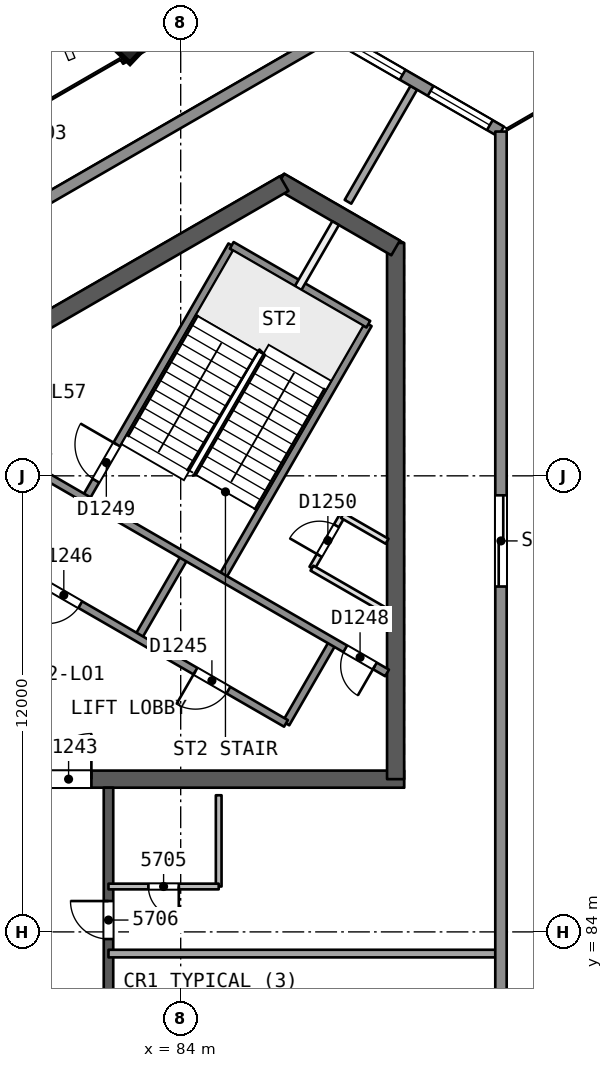
"""IFC4 building model, lengths in metres.
Left out: names, types, materials, properties, quantities, classifications, styles, units other than length and angle.
Written with IfcOpenShell. Run it as: python <this file> out.ifc"""

import sys

from ifc_helpers import new_model, si_unit, direction, frame, frame_2d, origin, origin_2d, place, context, subcontext, project, spatial, rectangle, extrude, element, fill, save


model = new_model("IFC4")
c1 = context("Model", 3, precision=1e-05, world=origin(), true_north=direction((0.0, 1.0)))
c2 = subcontext(c1, "Body", "Model", "MODEL_VIEW")
j1 = project(units=[si_unit("LENGTHUNIT", "METRE"), si_unit("PLANEANGLEUNIT", "RADIAN")], contexts=[c1])
p1 = place(None, origin())
s1 = spatial("IfcSite", under=j1, at=p1, CompositionType="ELEMENT")
p2 = place(p1, origin())
s2 = spatial("IfcBuilding", under=s1, at=p2, CompositionType="ELEMENT")
p3 = place(p2, frame((0.0, 0.0, 231.7)))
s3 = spatial("IfcBuildingStorey", under=s2, at=p3, CompositionType="ELEMENT", Elevation=231.7)
p4 = place(p3, frame((79.63, 88.019, 0.0), z_axis=(0.0, 0.0, 1.0), x_axis=(1.0, 0.0, 0.0)))
e1 = element("IfcWall", 1, at=p4, inside=s3, PredefinedType="SHEAR", context=c2, shape_type="SweptSolid", body=[
    extrude(rectangle(XDim=10.25, YDim=0.45, at=frame_2d((5.125, 0.0))), origin(), (0.0, 0.0, 1.0), 3.7),
])
p5 = place(p4, frame((0.82, 0.0, 0.0)))
e2 = element("IfcOpeningElement", 2, at=p5, cuts=e1, PredefinedType="OPENING", context=c2, shape_type="SweptSolid", body=[
    extrude(rectangle(XDim=1.2, YDim=2.1, at=frame_2d((0.6, 1.05))), frame((0.0, 0.235, 0.0), z_axis=(0.0, -1.0, 0.0), x_axis=(1.0, 0.0, 0.0)), (0.0, 0.0, 1.0), 0.471),
])
p6 = place(p3, frame((89.655, 88.019, 0.0), z_axis=(0.0, 0.0, 1.0), x_axis=(0.0, 1.0, 0.0)))
e3 = element("IfcWall", 3, at=p6, inside=s3, PredefinedType="SHEAR", context=c2, shape_type="SweptSolid", body=[
    extrude(rectangle(XDim=14.108, YDim=0.45, at=frame_2d((7.054, 0.0))), origin(), (0.0, 0.0, 1.0), 3.7),
])
p7 = place(p3, frame((89.655, 101.998, 0.0), z_axis=(0.0, 0.0, 1.0), x_axis=(-0.866042179588, 0.49997094233, 0.0)))
e4 = element("IfcWall", 4, at=p7, inside=s3, PredefinedType="SHEAR", context=c2, shape_type="SweptSolid", body=[
    extrude(rectangle(XDim=3.515, YDim=0.45, at=frame_2d((1.758, 0.0))), origin(), (0.0, 0.0, 1.0), 3.7),
])
p8 = place(p3, frame((86.723, 103.69, 0.0), z_axis=(0.0, 0.0, 1.0), x_axis=(-0.866022713978, -0.500004658852, 0.0)))
e5 = element("IfcWall", 5, at=p8, inside=s3, PredefinedType="SHEAR", context=c2, shape_type="SweptSolid", body=[
    extrude(rectangle(XDim=14.203, YDim=0.45, at=frame_2d((7.102, 0.0))), origin(), (0.0, 0.0, 1.0), 3.7),
])
p9 = place(p3, frame((82.1, 72.206, 0.0), z_axis=(0.0, 0.0, 1.0), x_axis=(0.0, 1.0, 0.0)))
e6 = element("IfcWall", 6, at=p9, inside=s3, PredefinedType="SHEAR", context=c2, shape_type="SweptSolid", body=[
    extrude(rectangle(XDim=15.588, YDim=0.25, at=frame_2d((7.794, 0.0))), origin(), (0.0, 0.0, 1.0), 3.3),
])
p10 = place(p9, frame((2.15, 0.0, 0.0)))
e7 = element("IfcOpeningElement", 7, at=p10, cuts=e6, PredefinedType="OPENING", context=c2, shape_type="SweptSolid", body=[
    extrude(rectangle(XDim=1.0, YDim=2.1, at=frame_2d((0.5, 1.05))), frame((0.0, 0.135, 0.0), z_axis=(0.0, -1.0, 0.0), x_axis=(1.0, 0.0, 0.0)), (0.0, 0.0, 1.0), 0.271),
])
p11 = place(p9, frame((7.662, 0.0, 0.0)))
e8 = element("IfcOpeningElement", 8, at=p11, cuts=e6, PredefinedType="OPENING", context=c2, shape_type="SweptSolid", body=[
    extrude(rectangle(XDim=1.2, YDim=2.4, at=frame_2d((0.6, 1.2))), frame((0.0, 0.135, 0.0), z_axis=(0.0, -1.0, 0.0), x_axis=(1.0, 0.0, 0.0)), (0.0, 0.0, 1.0), 0.271),
])
p12 = place(p9, frame((11.606, 0.0, 0.0)))
e9 = element("IfcOpeningElement", 9, at=p12, cuts=e6, PredefinedType="OPENING", context=c2, shape_type="SweptSolid", body=[
    extrude(rectangle(XDim=1.0, YDim=2.1, at=frame_2d((0.5, 1.05))), frame((0.0, 0.135, 0.0), z_axis=(0.0, -1.0, 0.0), x_axis=(1.0, 0.0, 0.0)), (0.0, 0.0, 1.0), 0.271),
])
p13 = place(p3, frame((91.483, 108.549, 0.0), z_axis=(-0.017607037296, -0.030466109479, 0.999380712447), x_axis=(0.500067085975, 0.865271470658, 0.035187946645)))
e10 = element("IfcColumn", 10, at=p13, inside=s3, PredefinedType="COLUMN", context=c2, shape_type="SweptSolid", body=[
    extrude(rectangle(XDim=1.9, YDim=1.9, at=origin_2d()), origin(), (0.0, 0.0, 1.0), 3.702),
])
p14 = place(p3, frame((82.659, 107.49, 0.0), z_axis=(-0.00837646992, -0.028097450282, 0.999570091609), x_axis=(0.866174253108, 0.499288249334, 0.021293363534)))
e11 = element("IfcColumn", 11, at=p14, inside=s3, PredefinedType="COLUMN", context=c2, shape_type="SweptSolid", body=[
    extrude(rectangle(XDim=0.85, YDim=0.85, at=origin_2d()), origin(), (0.0, 0.0, 1.0), 3.702),
])
p15 = place(p3, frame((92.279, 83.429, 0.0), z_axis=(0.0, 0.0, 1.0), x_axis=(-1.0, 0.0, 0.0)))
e12 = element("IfcWall", 12, at=p15, inside=s3, PredefinedType="PARTITIONING", context=c2, shape_type="SweptSolid", body=[
    extrude(rectangle(XDim=10.179, YDim=0.2, at=frame_2d((5.089, 0.0))), origin(), (0.0, 0.0, 1.0), 3.3),
])
p16 = place(p3, frame((85.0, 87.595, 0.0), z_axis=(0.0, 0.0, 1.0), x_axis=(0.0, -1.0, 0.0)))
e13 = element("IfcWall", 13, at=p16, inside=s3, PredefinedType="PARTITIONING", context=c2, shape_type="SweptSolid", body=[
    extrude(rectangle(XDim=2.401, YDim=0.15, at=frame_2d((1.2, 0.0))), origin(), (0.0, 0.0, 1.0), 3.3),
])
p17 = place(p3, frame((85.0, 85.194, 0.0), z_axis=(0.0, 0.0, 1.0), x_axis=(-1.0, 0.0, 0.0)))
e14 = element("IfcWall", 14, at=p17, inside=s3, PredefinedType="PARTITIONING", context=c2, shape_type="SweptSolid", body=[
    extrude(rectangle(XDim=2.9, YDim=0.15, at=frame_2d((1.45, 0.0))), origin(), (0.0, 0.0, 1.0), 3.3),
])
p18 = place(p17, frame((1.05, 0.0, 0.0)))
e15 = element("IfcOpeningElement", 15, at=p18, cuts=e14, PredefinedType="OPENING", context=c2, shape_type="SweptSolid", body=[
    extrude(rectangle(XDim=0.8, YDim=2.1, at=frame_2d((0.4, 1.05))), frame((0.0, 0.085, 0.0), z_axis=(0.0, -1.0, 0.0), x_axis=(1.0, 0.0, 0.0)), (0.0, 0.0, 1.0), 0.171),
])
p19 = place(p3, frame((90.134, 106.211, 0.0), z_axis=(0.0, 0.0, 1.0), x_axis=(-0.500019299785, -0.866014260761, 0.0)))
e16 = element("IfcWall", 16, at=p19, inside=s3, PredefinedType="PARTITIONING", context=c2, shape_type="SweptSolid", body=[
    extrude(rectangle(XDim=3.465, YDim=0.2, at=frame_2d((1.732, 0.0))), origin(), (0.0, 0.0, 1.0), 3.3),
])
p20 = place(p3, frame((87.988, 107.623, 0.0), z_axis=(0.0, 0.0, 1.0), x_axis=(0.866010338203, -0.500026093444, 0.0)))
e17 = element("IfcWall", 17, at=p20, inside=s3, PredefinedType="SOLIDWALL", context=c2, shape_type="SweptSolid", body=[
    extrude(rectangle(XDim=5.127, YDim=0.3, at=frame_2d((2.563, 0.0))), origin(), (0.0, 0.0, 1.0), 3.3),
])
p21 = place(p20, frame((2.988, 0.0, 0.9)))
e18 = element("IfcOpeningElement", 18, at=p21, cuts=e17, PredefinedType="OPENING", context=c2, shape_type="SweptSolid", body=[
    extrude(rectangle(XDim=1.8, YDim=1.5, at=frame_2d((0.9, 0.75))), frame((0.0, 0.161, 0.0), z_axis=(0.0, -1.0, 0.0), x_axis=(1.0, 0.0, 0.0)), (0.0, 0.0, 1.0), 0.321),
])
p22 = place(p20, frame((0.339, 0.0, 0.9)))
e19 = element("IfcOpeningElement", 19, at=p22, cuts=e17, PredefinedType="OPENING", context=c2, shape_type="SweptSolid", body=[
    extrude(rectangle(XDim=1.8, YDim=1.5, at=frame_2d((0.9, 0.75))), frame((0.0, 0.161, 0.0), z_axis=(0.0, -1.0, 0.0), x_axis=(1.0, 0.0, 0.0)), (0.0, 0.0, 1.0), 0.321),
])
p23 = place(p3, frame((92.428, 105.059, 0.0), z_axis=(0.0, 0.0, 1.0), x_axis=(0.0, -1.0, 0.0)))
e20 = element("IfcWall", 20, at=p23, inside=s3, PredefinedType="SOLIDWALL", context=c2, shape_type="SweptSolid", body=[
    extrude(rectangle(XDim=50.118, YDim=0.3, at=frame_2d((25.059, 0.0))), origin(), (0.0, 0.0, 1.0), 3.3),
])
p24 = place(p23, frame((29.003, 0.0, 0.0)))
e21 = element("IfcOpeningElement", 21, at=p24, cuts=e20, PredefinedType="OPENING", context=c2, shape_type="SweptSolid", body=[
    extrude(rectangle(XDim=2.4, YDim=2.4, at=frame_2d((1.2, 1.2))), frame((0.0, 0.161, 0.0), z_axis=(0.0, -1.0, 0.0), x_axis=(1.0, 0.0, 0.0)), (0.0, 0.0, 1.0), 0.321),
])
p25 = place(p23, frame((39.0, 0.0, 0.0)))
e22 = element("IfcOpeningElement", 22, at=p25, cuts=e20, PredefinedType="OPENING", context=c2, shape_type="SweptSolid", body=[
    extrude(rectangle(XDim=2.4, YDim=2.4, at=frame_2d((1.2, 1.2))), frame((0.0, 0.161, 0.0), z_axis=(0.0, -1.0, 0.0), x_axis=(1.0, 0.0, 0.0)), (0.0, 0.0, 1.0), 0.321),
])
p26 = place(p23, frame((9.572, 0.0, 0.0)))
e23 = element("IfcOpeningElement", 23, at=p26, cuts=e20, PredefinedType="OPENING", context=c2, shape_type="SweptSolid", body=[
    extrude(rectangle(XDim=2.4, YDim=2.4, at=frame_2d((1.2, 1.2))), frame((0.0, 0.161, 0.0), z_axis=(0.0, -1.0, 0.0), x_axis=(1.0, 0.0, 0.0)), (0.0, 0.0, 1.0), 0.321),
])
p27 = place(p23, frame((23.391, 0.0, 0.0)))
e24 = element("IfcOpeningElement", 24, at=p27, cuts=e20, PredefinedType="OPENING", context=c2, shape_type="SweptSolid", body=[
    extrude(rectangle(XDim=2.4, YDim=2.4, at=frame_2d((1.2, 1.2))), frame((0.0, 0.161, 0.0), z_axis=(0.0, -1.0, 0.0), x_axis=(1.0, 0.0, 0.0)), (0.0, 0.0, 1.0), 0.321),
])
p28 = place(p3, frame((44.584, 82.563, 0.0), z_axis=(0.0, 0.0, 1.0), x_axis=(0.866023992326, 0.500002444709, 0.0)))
e25 = element("IfcWall", 25, at=p28, inside=s3, PredefinedType="SOLIDWALL", context=c2, shape_type="SweptSolid", body=[
    extrude(rectangle(XDim=50.118, YDim=0.3, at=frame_2d((25.059, 0.0))), origin(), (0.0, 0.0, 1.0), 3.3),
])
p29 = place(p28, frame((23.391, 0.0, 0.0)))
e26 = element("IfcOpeningElement", 26, at=p29, cuts=e25, PredefinedType="OPENING", context=c2, shape_type="SweptSolid", body=[
    extrude(rectangle(XDim=2.4, YDim=2.4, at=frame_2d((1.2, 1.2))), frame((0.0, 0.161, 0.0), z_axis=(0.0, -1.0, 0.0), x_axis=(1.0, 0.0, 0.0)), (0.0, 0.0, 1.0), 0.321),
])
p30 = place(p28, frame((37.835, 0.0, 0.0)))
e27 = element("IfcOpeningElement", 27, at=p30, cuts=e25, PredefinedType="OPENING", context=c2, shape_type="SweptSolid", body=[
    extrude(rectangle(XDim=2.4, YDim=2.4, at=frame_2d((1.2, 1.2))), frame((0.0, 0.161, 0.0), z_axis=(0.0, -1.0, 0.0), x_axis=(1.0, 0.0, 0.0)), (0.0, 0.0, 1.0), 0.321),
])
p31 = place(p28, frame((9.416, 0.0, 0.0)))
e28 = element("IfcOpeningElement", 28, at=p31, cuts=e25, PredefinedType="OPENING", context=c2, shape_type="SweptSolid", body=[
    extrude(rectangle(XDim=2.4, YDim=2.4, at=frame_2d((1.2, 1.2))), frame((0.0, 0.161, 0.0), z_axis=(0.0, -1.0, 0.0), x_axis=(1.0, 0.0, 0.0)), (0.0, 0.0, 1.0), 0.321),
])
p32 = place(p3, frame((86.77, 89.486, 0.0), z_axis=(0.0, 0.0, 1.0), x_axis=(0.499961042966, 0.86604789447, 0.0)))
e29 = element("IfcWall", 29, at=p32, inside=s3, PredefinedType="SOLIDWALL", context=c2, shape_type="SweptSolid", body=[
    extrude(rectangle(XDim=2.48, YDim=0.2, at=frame_2d((1.24, 0.0))), origin(), (0.0, 0.0, 1.0), 3.3),
])
p33 = place(p3, frame((87.454, 93.571, 0.0), z_axis=(0.0, 0.0, 1.0), x_axis=(0.499995408039, 0.866028054938, 0.0)))
e30 = element("IfcWall", 30, at=p33, inside=s3, PredefinedType="PARTITIONING", context=c2, shape_type="SweptSolid", body=[
    extrude(rectangle(XDim=1.6, YDim=0.15, at=frame_2d((0.8, 0.0))), origin(), (0.0, 0.0, 1.0), 3.3),
])
p34 = place(p33, frame((0.387, 0.0, 0.0)))
e31 = element("IfcOpeningElement", 31, at=p34, cuts=e30, PredefinedType="OPENING", context=c2, shape_type="SweptSolid", body=[
    extrude(rectangle(XDim=0.9, YDim=2.1, at=frame_2d((0.45, 1.05))), frame((0.0, 0.085, 0.0), z_axis=(0.0, -1.0, 0.0), x_axis=(1.0, 0.0, 0.0)), (0.0, 0.0, 1.0), 0.171),
])
p35 = place(p3, frame((85.087, 93.321, 0.0), z_axis=(0.0, 0.0, 1.0), x_axis=(0.500019787375, 0.866013979237, 0.0)))
e32 = element("IfcWall", 32, at=p35, inside=s3, PredefinedType="SOLIDWALL", context=c2, shape_type="SweptSolid", body=[
    extrude(rectangle(XDim=7.7, YDim=0.2, at=frame_2d((3.85, 0.0))), origin(), (0.0, 0.0, 1.0), 3.3),
])
p36 = place(p3, frame((82.873, 91.736, 0.0), z_axis=(0.0, 0.0, 1.0), x_axis=(0.499961042966, 0.86604789447, 0.0)))
e33 = element("IfcWall", 33, at=p36, inside=s3, PredefinedType="SOLIDWALL", context=c2, shape_type="SweptSolid", body=[
    extrude(rectangle(XDim=2.48, YDim=0.2, at=frame_2d((1.24, 0.0))), origin(), (0.0, 0.0, 1.0), 3.3),
])
p37 = place(p3, frame((87.09, 100.94, 0.0), z_axis=(0.0, 0.0, 1.0), x_axis=(0.500011643316, 0.866018681408, 0.0)))
e34 = element("IfcWall", 34, at=p37, inside=s3, PredefinedType="PARTITIONING", context=c2, shape_type="SweptSolid", body=[
    extrude(rectangle(XDim=1.973, YDim=0.2, at=frame_2d((0.987, 0.0))), origin(), (0.0, 0.0, 1.0), 3.3),
])
p38 = place(p3, frame((81.493, 95.396, 0.0), z_axis=(0.0, 0.0, 1.0), x_axis=(0.500006057782, 0.866021906294, 0.0)))
e35 = element("IfcWall", 35, at=p38, inside=s3, PredefinedType="SOLIDWALL", context=c2, shape_type="SweptSolid", body=[
    extrude(rectangle(XDim=7.7, YDim=0.2, at=frame_2d((3.85, 0.0))), origin(), (0.0, 0.0, 1.0), 3.3),
])
p39 = place(p38, frame((0.55, 0.0, 0.0)))
e36 = element("IfcOpeningElement", 36, at=p39, cuts=e35, PredefinedType="OPENING", context=c2, shape_type="SweptSolid", body=[
    extrude(rectangle(XDim=1.1, YDim=2.1, at=frame_2d((0.55, 1.05))), frame((0.0, 0.11, 0.0), z_axis=(0.0, -1.0, 0.0), x_axis=(1.0, 0.0, 0.0)), (0.0, 0.0, 1.0), 0.221),
])
p40 = place(p3, frame((86.77, 89.486, 0.0), z_axis=(0.0, 0.0, 1.0), x_axis=(-0.86601811187, 0.500012629753, 0.0)))
e37 = element("IfcWall", 37, at=p40, inside=s3, PredefinedType="SOLIDWALL", context=c2, shape_type="SweptSolid", body=[
    extrude(rectangle(XDim=10.9, YDim=0.2, at=frame_2d((5.45, 0.0))), origin(), (0.0, 0.0, 1.0), 3.3),
])
p41 = place(p40, frame((1.75, 0.0, 0.0)))
e38 = element("IfcOpeningElement", 38, at=p41, cuts=e37, PredefinedType="OPENING", context=c2, shape_type="SweptSolid", body=[
    extrude(rectangle(XDim=1.0, YDim=2.1, at=frame_2d((0.5, 1.05))), frame((0.0, 0.11, 0.0), z_axis=(0.0, -1.0, 0.0), x_axis=(1.0, 0.0, 0.0)), (0.0, 0.0, 1.0), 0.221),
])
p42 = place(p40, frame((6.25, 0.0, 0.0)))
e39 = element("IfcOpeningElement", 39, at=p42, cuts=e37, PredefinedType="OPENING", context=c2, shape_type="SweptSolid", body=[
    extrude(rectangle(XDim=1.0, YDim=2.1, at=frame_2d((0.5, 1.05))), frame((0.0, 0.11, 0.0), z_axis=(0.0, -1.0, 0.0), x_axis=(1.0, 0.0, 0.0)), (0.0, 0.0, 1.0), 0.221),
])
p43 = place(p3, frame((89.43, 90.814, 0.0), z_axis=(0.0, 0.0, 1.0), x_axis=(-0.866018983788, 0.500011119594, 0.0)))
e40 = element("IfcWall", 40, at=p43, inside=s3, PredefinedType="SOLIDWALL", context=c2, shape_type="SweptSolid", body=[
    extrude(rectangle(XDim=10.64, YDim=0.2, at=frame_2d((5.32, 0.0))), origin(), (0.0, 0.0, 1.0), 3.3),
])
p44 = place(p43, frame((0.37, 0.0, 0.0)))
e41 = element("IfcOpeningElement", 41, at=p44, cuts=e40, PredefinedType="OPENING", context=c2, shape_type="SweptSolid", body=[
    extrude(rectangle(XDim=0.9, YDim=2.1, at=frame_2d((0.45, 1.05))), frame((0.0, 0.11, 0.0), z_axis=(0.0, -1.0, 0.0), x_axis=(1.0, 0.0, 0.0)), (0.0, 0.0, 1.0), 0.221),
])
p45 = place(p3, frame((89.43, 92.43, 0.0), z_axis=(0.0, 0.0, 1.0), x_axis=(-0.866048373726, 0.499960212783, 0.0)))
e42 = element("IfcWall", 42, at=p45, inside=s3, PredefinedType="PARTITIONING", context=c2, shape_type="SweptSolid", body=[
    extrude(rectangle(XDim=2.281, YDim=0.15, at=frame_2d((1.141, 0.0))), origin(), (0.0, 0.0, 1.0), 3.3),
])
p46 = place(p3, frame((89.43, 94.278, 0.0), z_axis=(0.0, 0.0, 1.0), x_axis=(-0.865987941628, 0.500064880745, 0.0)))
e43 = element("IfcWall", 43, at=p46, inside=s3, PredefinedType="PARTITIONING", context=c2, shape_type="SweptSolid", body=[
    extrude(rectangle(XDim=1.358, YDim=0.15, at=frame_2d((0.679, 0.0))), origin(), (0.0, 0.0, 1.0), 3.3),
])
p47 = place(p3, frame((88.937, 99.99, 0.0), z_axis=(0.0, 0.0, 1.0), x_axis=(-0.866004344652, 0.500036473714, 0.0)))
e44 = element("IfcWall", 44, at=p47, inside=s3, PredefinedType="SOLIDWALL", context=c2, shape_type="SweptSolid", body=[
    extrude(rectangle(XDim=4.15, YDim=0.2, at=frame_2d((2.075, 0.0))), origin(), (0.0, 0.0, 1.0), 3.3),
])
p48 = place(p18, origin())
e45 = element("IfcDoor", 45, at=p48, inside=s3, OperationType="SINGLE_SWING_LEFT", PredefinedType="NOTDEFINED", context=c2, shape_type="SweptSolid", body=[
    extrude(rectangle(XDim=0.8, YDim=2.1, at=frame_2d((0.4, 1.05))), frame((0.0, 0.025, 0.0), z_axis=(0.0, -1.0, 0.0), x_axis=(1.0, 0.0, 0.0)), (0.0, 0.0, 1.0), 0.05),
])
fill(e15, e45)
p49 = place(p12, origin())
e46 = element("IfcDoor", 46, at=p49, inside=s3, OperationType="SINGLE_SWING_RIGHT", PredefinedType="NOTDEFINED", context=c2, shape_type="SweptSolid", body=[
    extrude(rectangle(XDim=1.0, YDim=2.1, at=frame_2d((0.5, 1.05))), frame((0.0, 0.025, 0.0), z_axis=(0.0, -1.0, 0.0), x_axis=(1.0, 0.0, 0.0)), (0.0, 0.0, 1.0), 0.05),
])
fill(e9, e46)
p50 = place(p21, origin())
e47 = element("IfcWindow", 47, at=p50, inside=s3, PartitioningType="SINGLE_PANEL", PredefinedType="WINDOW", context=c2, shape_type="SweptSolid", body=[
    extrude(rectangle(XDim=1.8, YDim=1.5, at=frame_2d((0.9, 0.75))), frame((0.0, 0.03, 0.0), z_axis=(0.0, -1.0, 0.0), x_axis=(1.0, 0.0, 0.0)), (0.0, 0.0, 1.0), 0.06),
])
fill(e18, e47)
p51 = place(p22, origin())
e48 = element("IfcWindow", 48, at=p51, inside=s3, PartitioningType="SINGLE_PANEL", PredefinedType="WINDOW", context=c2, shape_type="SweptSolid", body=[
    extrude(rectangle(XDim=1.8, YDim=1.5, at=frame_2d((0.9, 0.75))), frame((0.0, 0.03, 0.0), z_axis=(0.0, -1.0, 0.0), x_axis=(1.0, 0.0, 0.0)), (0.0, 0.0, 1.0), 0.06),
])
fill(e19, e48)
p52 = place(p26, origin())
e49 = element("IfcDoor", 49, at=p52, inside=s3, OperationType="SLIDING_TO_LEFT", PredefinedType="NOTDEFINED", context=c2, shape_type="SweptSolid", body=[
    extrude(rectangle(XDim=2.4, YDim=2.4, at=frame_2d((1.2, 1.2))), frame((0.0, 0.025, 0.0), z_axis=(0.0, -1.0, 0.0), x_axis=(1.0, 0.0, 0.0)), (0.0, 0.0, 1.0), 0.05),
])
fill(e23, e49)
p53 = place(p5, origin())
e50 = element("IfcDoor", 50, at=p53, inside=s3, OperationType="SINGLE_SWING_RIGHT", PredefinedType="NOTDEFINED", context=c2, shape_type="SweptSolid", body=[
    extrude(rectangle(XDim=1.2, YDim=2.1, at=frame_2d((0.6, 1.05))), frame((0.0, 0.025, 0.0), z_axis=(0.0, -1.0, 0.0), x_axis=(1.0, 0.0, 0.0)), (0.0, 0.0, 1.0), 0.05),
])
fill(e2, e50)
p54 = place(p41, origin())
e51 = element("IfcDoor", 51, at=p54, inside=s3, OperationType="SINGLE_SWING_RIGHT", PredefinedType="NOTDEFINED", context=c2, shape_type="SweptSolid", body=[
    extrude(rectangle(XDim=1.0, YDim=2.1, at=frame_2d((0.5, 1.05))), frame((0.0, 0.025, 0.0), z_axis=(0.0, -1.0, 0.0), x_axis=(1.0, 0.0, 0.0)), (0.0, 0.0, 1.0), 0.05),
])
fill(e38, e51)
p55 = place(p42, origin())
e52 = element("IfcDoor", 52, at=p55, inside=s3, OperationType="SINGLE_SWING_RIGHT", PredefinedType="NOTDEFINED", context=c2, shape_type="SweptSolid", body=[
    extrude(rectangle(XDim=1.0, YDim=2.1, at=frame_2d((0.5, 1.05))), frame((0.0, 0.025, 0.0), z_axis=(0.0, -1.0, 0.0), x_axis=(1.0, 0.0, 0.0)), (0.0, 0.0, 1.0), 0.05),
])
fill(e39, e52)
p56 = place(p44, origin())
e53 = element("IfcDoor", 53, at=p56, inside=s3, OperationType="SINGLE_SWING_LEFT", PredefinedType="NOTDEFINED", context=c2, shape_type="SweptSolid", body=[
    extrude(rectangle(XDim=0.9, YDim=2.1, at=frame_2d((0.45, 1.05))), frame((0.0, 0.025, 0.0), z_axis=(0.0, -1.0, 0.0), x_axis=(1.0, 0.0, 0.0)), (0.0, 0.0, 1.0), 0.05),
])
fill(e41, e53)
p57 = place(p39, origin())
e54 = element("IfcDoor", 54, at=p57, inside=s3, OperationType="SINGLE_SWING_RIGHT", PredefinedType="NOTDEFINED", context=c2, shape_type="SweptSolid", body=[
    extrude(rectangle(XDim=1.1, YDim=2.1, at=frame_2d((0.55, 1.05))), frame((0.0, 0.025, 0.0), z_axis=(0.0, -1.0, 0.0), x_axis=(1.0, 0.0, 0.0)), (0.0, 0.0, 1.0), 0.05),
])
fill(e36, e54)
p58 = place(p34, origin())
e55 = element("IfcDoor", 55, at=p58, inside=s3, OperationType="SINGLE_SWING_LEFT", PredefinedType="NOTDEFINED", context=c2, shape_type="SweptSolid", body=[
    extrude(rectangle(XDim=0.9, YDim=2.1, at=frame_2d((0.45, 1.05))), frame((0.0, 0.025, 0.0), z_axis=(0.0, -1.0, 0.0), x_axis=(1.0, 0.0, 0.0)), (0.0, 0.0, 1.0), 0.05),
])
fill(e31, e55)
save(model, sys.argv[1])
